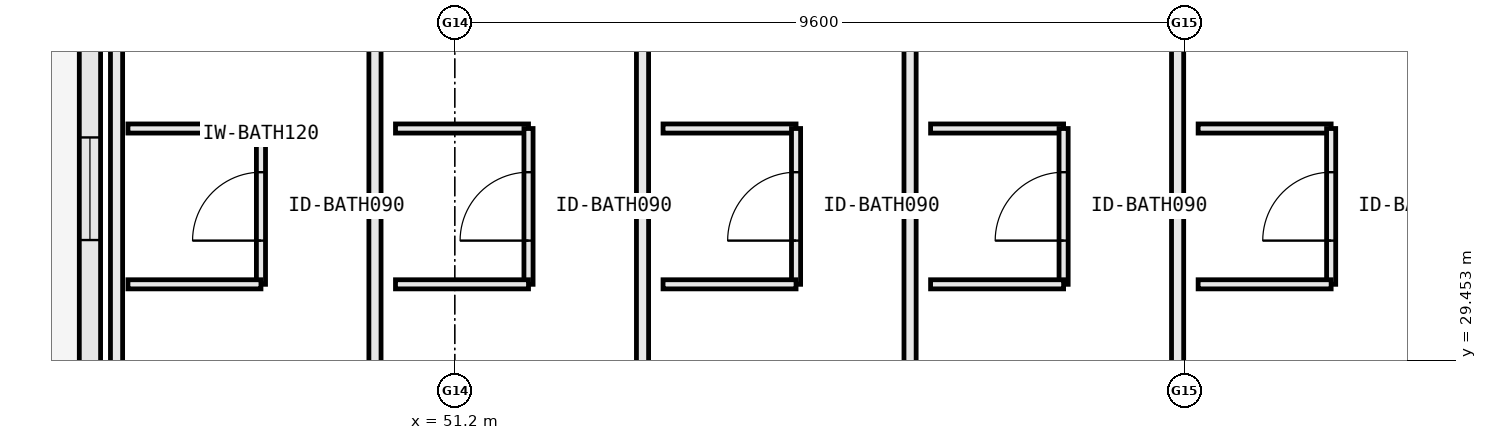
"""IFC4 building model, lengths in metres.
Left out: names, types, materials, properties, quantities, classifications, styles, units other than length and angle.
Written with IfcOpenShell. Run it as: python <this file> out.ifc"""

import sys

from ifc_helpers import new_model, si_unit, direction, frame, frame_2d, origin, place, context, subcontext, project, spatial, rectangle, extrude, element, fill, save


model = new_model("IFC4")
c1 = context("Model", 3, precision=1e-05, world=origin(), true_north=direction((0.0, 1.0)))
c2 = subcontext(c1, "Body", "Model", "MODEL_VIEW")
j1 = project(units=[si_unit("LENGTHUNIT", "METRE"), si_unit("PLANEANGLEUNIT", "RADIAN")], contexts=[c1])
p1 = place(None, origin())
s1 = spatial("IfcSite", under=j1, at=p1, CompositionType="ELEMENT")
p2 = place(p1, origin())
s2 = spatial("IfcBuilding", under=s1, at=p2, CompositionType="ELEMENT")
p3 = place(p2, frame((0.0, 0.0, 39.0)))
s3 = spatial("IfcBuildingStorey", under=s2, at=p3, CompositionType="ELEMENT", Elevation=39.0)
p4 = place(p3, frame((46.4, 36.192, 0.0), z_axis=(0.0, 0.0, 1.0), x_axis=(0.0, -1.0, 0.0)))
e1 = element("IfcWall", 1, at=p4, inside=s3, PredefinedType="STANDARD", context=c2, shape_type="SweptSolid", body=[
    extrude(rectangle(XDim=8.969, YDim=0.28, at=frame_2d((4.484, 0.0))), origin(), (0.0, 0.0, 1.0), 2.94),
])
p5 = place(p4, frame((3.81, 0.0, 0.85)))
e2 = element("IfcOpeningElement", 2, at=p5, cuts=e1, PredefinedType="OPENING", context=c2, shape_type="SweptSolid", body=[
    extrude(rectangle(XDim=1.35, YDim=1.65, at=frame_2d((0.675, 0.825))), frame((0.0, 0.152, 0.0), z_axis=(0.0, -1.0, 0.0), x_axis=(1.0, 0.0, 0.0)), (0.0, 0.0, 1.0), 0.304),
])
p6 = place(p3, frame((46.75, 27.16, 0.0), z_axis=(0.0, 0.0, 1.0), x_axis=(0.0, 1.0, 0.0)))
e3 = element("IfcWall", 3, at=p6, inside=s3, PredefinedType="PARTITIONING", context=c2, shape_type="SweptSolid", body=[
    extrude(rectangle(XDim=10.34, YDim=0.16, at=frame_2d((5.17, 0.0))), origin(), (0.0, 0.0, 1.0), 2.92),
])
p7 = place(p3, frame((50.15, 27.16, 0.0), z_axis=(0.0, 0.0, 1.0), x_axis=(0.0, 1.0, 0.0)))
e4 = element("IfcWall", 4, at=p7, inside=s3, PredefinedType="PARTITIONING", context=c2, shape_type="SweptSolid", body=[
    extrude(rectangle(XDim=10.34, YDim=0.16, at=frame_2d((5.17, 0.0))), origin(), (0.0, 0.0, 1.0), 3.565),
])
p8 = place(p3, frame((46.9, 32.5, 0.0), z_axis=(0.0, 0.0, 1.0), x_axis=(1.0, 0.0, 0.0)))
e5 = element("IfcWall", 5, at=p8, inside=s3, PredefinedType="PARTITIONING", context=c2, shape_type="SweptSolid", body=[
    extrude(rectangle(XDim=1.75, YDim=0.12, at=frame_2d((0.875, 0.0))), origin(), (0.0, 0.0, 1.0), 3.565),
])
p9 = place(p3, frame((48.65, 30.45, 0.0), z_axis=(0.0, 0.0, 1.0), x_axis=(0.0, 1.0, 0.0)))
e6 = element("IfcWall", 6, at=p9, inside=s3, PredefinedType="PARTITIONING", context=c2, shape_type="SweptSolid", body=[
    extrude(rectangle(XDim=2.05, YDim=0.12, at=frame_2d((1.025, 0.0))), origin(), (0.0, 0.0, 1.0), 3.11),
])
p10 = place(p9, frame((0.575, 0.0, 0.0)))
e7 = element("IfcOpeningElement", 7, at=p10, cuts=e6, PredefinedType="OPENING", context=c2, shape_type="SweptSolid", body=[
    extrude(rectangle(XDim=0.9, YDim=2.15, at=frame_2d((0.45, 1.075))), frame((0.0, 0.072, 0.0), z_axis=(0.0, -1.0, 0.0), x_axis=(1.0, 0.0, 0.0)), (0.0, 0.0, 1.0), 0.144),
])
p11 = place(p3, frame((46.9, 30.45, 0.0), z_axis=(0.0, 0.0, 1.0), x_axis=(1.0, 0.0, 0.0)))
e8 = element("IfcWall", 8, at=p11, inside=s3, PredefinedType="PARTITIONING", context=c2, shape_type="SweptSolid", body=[
    extrude(rectangle(XDim=1.75, YDim=0.12, at=frame_2d((0.875, 0.0))), origin(), (0.0, 0.0, 1.0), 3.565),
])
p12 = place(p3, frame((53.67, 27.16, 0.0), z_axis=(0.0, 0.0, 1.0), x_axis=(0.0, 1.0, 0.0)))
e9 = element("IfcWall", 9, at=p12, inside=s3, PredefinedType="PARTITIONING", context=c2, shape_type="SweptSolid", body=[
    extrude(rectangle(XDim=10.34, YDim=0.16, at=frame_2d((5.17, 0.0))), origin(), (0.0, 0.0, 1.0), 3.565),
])
p13 = place(p3, frame((50.42, 32.5, 0.0), z_axis=(0.0, 0.0, 1.0), x_axis=(1.0, 0.0, 0.0)))
e10 = element("IfcWall", 10, at=p13, inside=s3, PredefinedType="PARTITIONING", context=c2, shape_type="SweptSolid", body=[
    extrude(rectangle(XDim=1.75, YDim=0.12, at=frame_2d((0.875, 0.0))), origin(), (0.0, 0.0, 1.0), 3.565),
])
p14 = place(p3, frame((52.17, 30.45, 0.0), z_axis=(0.0, 0.0, 1.0), x_axis=(0.0, 1.0, 0.0)))
e11 = element("IfcWall", 11, at=p14, inside=s3, PredefinedType="PARTITIONING", context=c2, shape_type="SweptSolid", body=[
    extrude(rectangle(XDim=2.05, YDim=0.12, at=frame_2d((1.025, 0.0))), origin(), (0.0, 0.0, 1.0), 3.565),
])
p15 = place(p14, frame((0.575, 0.0, 0.0)))
e12 = element("IfcOpeningElement", 12, at=p15, cuts=e11, PredefinedType="OPENING", context=c2, shape_type="SweptSolid", body=[
    extrude(rectangle(XDim=0.9, YDim=2.15, at=frame_2d((0.45, 1.075))), frame((0.0, 0.072, 0.0), z_axis=(0.0, -1.0, 0.0), x_axis=(1.0, 0.0, 0.0)), (0.0, 0.0, 1.0), 0.144),
])
p16 = place(p3, frame((50.42, 30.45, 0.0), z_axis=(0.0, 0.0, 1.0), x_axis=(1.0, 0.0, 0.0)))
e13 = element("IfcWall", 13, at=p16, inside=s3, PredefinedType="PARTITIONING", context=c2, shape_type="SweptSolid", body=[
    extrude(rectangle(XDim=1.75, YDim=0.12, at=frame_2d((0.875, 0.0))), origin(), (0.0, 0.0, 1.0), 3.565),
])
p17 = place(p3, frame((57.19, 27.16, 0.0), z_axis=(0.0, 0.0, 1.0), x_axis=(0.0, 1.0, 0.0)))
e14 = element("IfcWall", 14, at=p17, inside=s3, PredefinedType="PARTITIONING", context=c2, shape_type="SweptSolid", body=[
    extrude(rectangle(XDim=10.34, YDim=0.16, at=frame_2d((5.17, 0.0))), origin(), (0.0, 0.0, 1.0), 3.11),
])
p18 = place(p3, frame((53.94, 32.5, 0.0), z_axis=(0.0, 0.0, 1.0), x_axis=(1.0, 0.0, 0.0)))
e15 = element("IfcWall", 15, at=p18, inside=s3, PredefinedType="PARTITIONING", context=c2, shape_type="SweptSolid", body=[
    extrude(rectangle(XDim=1.75, YDim=0.12, at=frame_2d((0.875, 0.0))), origin(), (0.0, 0.0, 1.0), 3.565),
])
p19 = place(p3, frame((55.69, 30.45, 0.0), z_axis=(0.0, 0.0, 1.0), x_axis=(0.0, 1.0, 0.0)))
e16 = element("IfcWall", 16, at=p19, inside=s3, PredefinedType="PARTITIONING", context=c2, shape_type="SweptSolid", body=[
    extrude(rectangle(XDim=2.05, YDim=0.12, at=frame_2d((1.025, 0.0))), origin(), (0.0, 0.0, 1.0), 3.565),
])
p20 = place(p19, frame((0.575, 0.0, 0.0)))
e17 = element("IfcOpeningElement", 17, at=p20, cuts=e16, PredefinedType="OPENING", context=c2, shape_type="SweptSolid", body=[
    extrude(rectangle(XDim=0.9, YDim=2.15, at=frame_2d((0.45, 1.075))), frame((0.0, 0.072, 0.0), z_axis=(0.0, -1.0, 0.0), x_axis=(1.0, 0.0, 0.0)), (0.0, 0.0, 1.0), 0.144),
])
p21 = place(p3, frame((53.94, 30.45, 0.0), z_axis=(0.0, 0.0, 1.0), x_axis=(1.0, 0.0, 0.0)))
e18 = element("IfcWall", 18, at=p21, inside=s3, PredefinedType="PARTITIONING", context=c2, shape_type="SweptSolid", body=[
    extrude(rectangle(XDim=1.75, YDim=0.12, at=frame_2d((0.875, 0.0))), origin(), (0.0, 0.0, 1.0), 3.565),
])
p22 = place(p3, frame((60.71, 27.16, 0.0), z_axis=(0.0, 0.0, 1.0), x_axis=(0.0, 1.0, 0.0)))
e19 = element("IfcWall", 19, at=p22, inside=s3, PredefinedType="PARTITIONING", context=c2, shape_type="SweptSolid", body=[
    extrude(rectangle(XDim=10.34, YDim=0.16, at=frame_2d((5.17, 0.0))), origin(), (0.0, 0.0, 1.0), 2.92),
])
p23 = place(p3, frame((57.46, 32.5, 0.0), z_axis=(0.0, 0.0, 1.0), x_axis=(1.0, 0.0, 0.0)))
e20 = element("IfcWall", 20, at=p23, inside=s3, PredefinedType="PARTITIONING", context=c2, shape_type="SweptSolid", body=[
    extrude(rectangle(XDim=1.75, YDim=0.12, at=frame_2d((0.875, 0.0))), origin(), (0.0, 0.0, 1.0), 3.565),
])
p24 = place(p3, frame((59.21, 30.45, 0.0), z_axis=(0.0, 0.0, 1.0), x_axis=(0.0, 1.0, 0.0)))
e21 = element("IfcWall", 21, at=p24, inside=s3, PredefinedType="PARTITIONING", context=c2, shape_type="SweptSolid", body=[
    extrude(rectangle(XDim=2.05, YDim=0.12, at=frame_2d((1.025, 0.0))), origin(), (0.0, 0.0, 1.0), 3.565),
])
p25 = place(p24, frame((0.575, 0.0, 0.0)))
e22 = element("IfcOpeningElement", 22, at=p25, cuts=e21, PredefinedType="OPENING", context=c2, shape_type="SweptSolid", body=[
    extrude(rectangle(XDim=0.9, YDim=2.15, at=frame_2d((0.45, 1.075))), frame((0.0, 0.072, 0.0), z_axis=(0.0, -1.0, 0.0), x_axis=(1.0, 0.0, 0.0)), (0.0, 0.0, 1.0), 0.144),
])
for number, where, z_axis, x_axis in (
    (23, (57.46, 30.45, 0.0), (0.0, 0.0, 1.0), (1.0, 0.0, 0.0)),
    (24, (60.98, 32.5, 0.0), (0.0, 0.0, 1.0), (1.0, 0.0, 0.0)),
):
    element("IfcWall", number, at=place(p3, frame(where, z_axis=z_axis, x_axis=x_axis)), inside=s3, PredefinedType="PARTITIONING", context=c2, shape_type="SweptSolid", body=[
        extrude(rectangle(XDim=1.75, YDim=0.12, at=frame_2d((0.875, 0.0))), origin(), (0.0, 0.0, 1.0), 3.565),
    ])
p26 = place(p3, frame((62.73, 30.45, 0.0), z_axis=(0.0, 0.0, 1.0), x_axis=(0.0, 1.0, 0.0)))
e25 = element("IfcWall", 25, at=p26, inside=s3, PredefinedType="PARTITIONING", context=c2, shape_type="SweptSolid", body=[
    extrude(rectangle(XDim=2.05, YDim=0.12, at=frame_2d((1.025, 0.0))), origin(), (0.0, 0.0, 1.0), 3.565),
])
p27 = place(p26, frame((0.575, 0.0, 0.0)))
e26 = element("IfcOpeningElement", 26, at=p27, cuts=e25, PredefinedType="OPENING", context=c2, shape_type="SweptSolid", body=[
    extrude(rectangle(XDim=0.9, YDim=2.15, at=frame_2d((0.45, 1.075))), frame((0.0, 0.072, 0.0), z_axis=(0.0, -1.0, 0.0), x_axis=(1.0, 0.0, 0.0)), (0.0, 0.0, 1.0), 0.144),
])
p28 = place(p3, frame((60.98, 30.45, 0.0), z_axis=(0.0, 0.0, 1.0), x_axis=(1.0, 0.0, 0.0)))
e27 = element("IfcWall", 27, at=p28, inside=s3, PredefinedType="PARTITIONING", context=c2, shape_type="SweptSolid", body=[
    extrude(rectangle(XDim=1.75, YDim=0.12, at=frame_2d((0.875, 0.0))), origin(), (0.0, 0.0, 1.0), 3.565),
])
p29 = place(p5, origin())
e28 = element("IfcWindow", 28, at=p29, inside=s3, PartitioningType="SINGLE_PANEL", PredefinedType="WINDOW", context=c2, shape_type="SweptSolid", body=[
    extrude(rectangle(XDim=1.35, YDim=1.65, at=frame_2d((0.675, 0.825))), frame((0.0, 0.03, 0.0), z_axis=(0.0, -1.0, 0.0), x_axis=(1.0, 0.0, 0.0)), (0.0, 0.0, 1.0), 0.06),
])
fill(e2, e28)
p30 = place(p10, origin())
e29 = element("IfcDoor", 29, at=p30, inside=s3, OperationType="SINGLE_SWING_LEFT", PredefinedType="DOOR", context=c2, shape_type="SweptSolid", body=[
    extrude(rectangle(XDim=0.9, YDim=2.15, at=frame_2d((0.45, 1.075))), frame((0.0, 0.025, 0.0), z_axis=(0.0, -1.0, 0.0), x_axis=(1.0, 0.0, 0.0)), (0.0, 0.0, 1.0), 0.05),
])
fill(e7, e29)
p31 = place(p15, origin())
e30 = element("IfcDoor", 30, at=p31, inside=s3, OperationType="SINGLE_SWING_LEFT", PredefinedType="DOOR", context=c2, shape_type="SweptSolid", body=[
    extrude(rectangle(XDim=0.9, YDim=2.15, at=frame_2d((0.45, 1.075))), frame((0.0, 0.025, 0.0), z_axis=(0.0, -1.0, 0.0), x_axis=(1.0, 0.0, 0.0)), (0.0, 0.0, 1.0), 0.05),
])
fill(e12, e30)
p32 = place(p20, origin())
e31 = element("IfcDoor", 31, at=p32, inside=s3, OperationType="SINGLE_SWING_LEFT", PredefinedType="DOOR", context=c2, shape_type="SweptSolid", body=[
    extrude(rectangle(XDim=0.9, YDim=2.15, at=frame_2d((0.45, 1.075))), frame((0.0, 0.025, 0.0), z_axis=(0.0, -1.0, 0.0), x_axis=(1.0, 0.0, 0.0)), (0.0, 0.0, 1.0), 0.05),
])
fill(e17, e31)
p33 = place(p25, origin())
e32 = element("IfcDoor", 32, at=p33, inside=s3, OperationType="SINGLE_SWING_LEFT", PredefinedType="DOOR", context=c2, shape_type="SweptSolid", body=[
    extrude(rectangle(XDim=0.9, YDim=2.15, at=frame_2d((0.45, 1.075))), frame((0.0, 0.025, 0.0), z_axis=(0.0, -1.0, 0.0), x_axis=(1.0, 0.0, 0.0)), (0.0, 0.0, 1.0), 0.05),
])
fill(e22, e32)
p34 = place(p27, origin())
e33 = element("IfcDoor", 33, at=p34, inside=s3, OperationType="SINGLE_SWING_LEFT", PredefinedType="DOOR", context=c2, shape_type="SweptSolid", body=[
    extrude(rectangle(XDim=0.9, YDim=2.15, at=frame_2d((0.45, 1.075))), frame((0.0, 0.025, 0.0), z_axis=(0.0, -1.0, 0.0), x_axis=(1.0, 0.0, 0.0)), (0.0, 0.0, 1.0), 0.05),
])
fill(e26, e33)
save(model, sys.argv[1])
